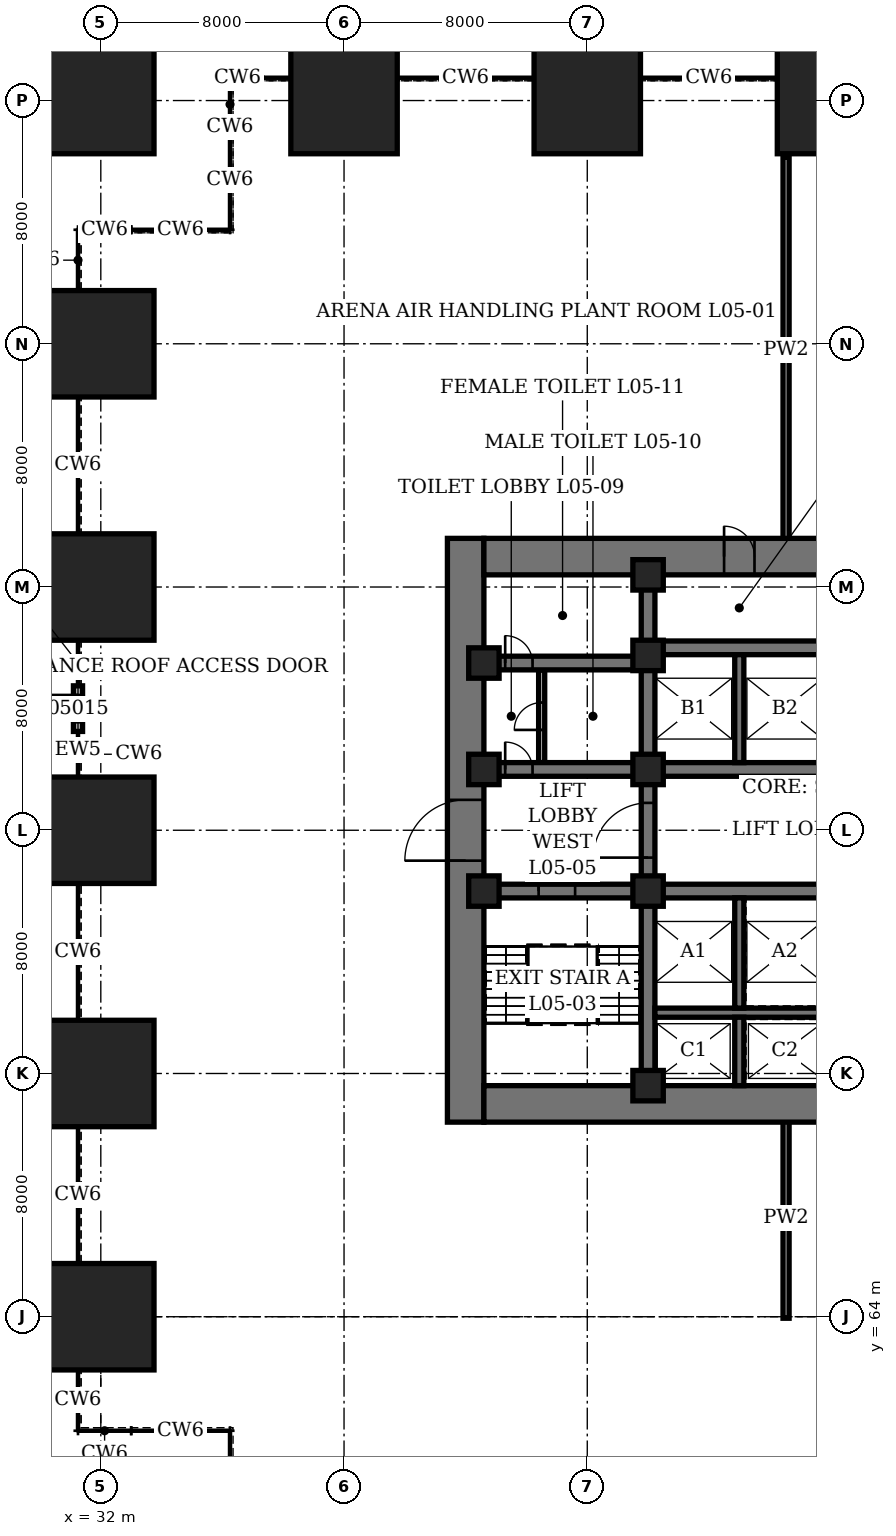
"""IFC4 building model, lengths in metres.
Left out: names, types, materials, properties, quantities, classifications, styles, units other than length and angle.
Written with IfcOpenShell. Run it as: python <this file> out.ifc"""

import sys

from ifc_helpers import new_model, si_unit, direction, frame, frame_2d, origin, origin_2d, place, context, subcontext, project, spatial, rectangle, hollow_rectangle, extrude, element, fill, save


model = new_model("IFC4")
c1 = context("Model", 3, precision=1e-05, world=origin(), true_north=direction((0.0, 1.0)))
c2 = subcontext(c1, "Body", "Model", "MODEL_VIEW")
j1 = project(units=[si_unit("LENGTHUNIT", "METRE"), si_unit("PLANEANGLEUNIT", "RADIAN")], contexts=[c1])
p1 = place(None, origin())
s1 = spatial("IfcSite", under=j1, at=p1, CompositionType="ELEMENT")
p2 = place(p1, origin())
s2 = spatial("IfcBuilding", under=s1, at=p2, CompositionType="ELEMENT")
p3 = place(p2, frame((0.0, 0.0, 25.9)))
s3 = spatial("IfcBuildingStorey", under=s2, at=p3, CompositionType="ELEMENT", Elevation=25.9)
for number, where, z_axis, x_axis in (
    (1, (32.0, 64.0, 0.0), (0.0, 0.0, 1.0), (1.0, 0.0, 0.0)),
    (2, (32.0, 72.0, 0.0), (0.0, 0.0, 1.0), (1.0, 0.0, 0.0)),
    (3, (32.0, 80.0, 0.0), (0.0, 0.0, 1.0), (1.0, 0.0, 0.0)),
    (4, (32.0, 88.0, 0.0), (0.0, 0.0, 1.0), (1.0, 0.0, 0.0)),
    (5, (32.0, 96.0, 0.0), (0.0, 0.0, 1.0), (1.0, 0.0, 0.0)),
    (6, (32.0, 104.0, 0.0), (0.0, 0.0, 1.0), (1.0, 0.0, 0.0)),
    (7, (40.0, 104.0, 0.0), (0.0, 0.0, 1.0), (1.0, 0.0, 0.0)),
    (8, (48.0, 104.0, 0.0), (0.0, 0.0, 1.0), (1.0, 0.0, 0.0)),
    (9, (56.0, 104.0, 0.0), (0.0, 0.0, 1.0), (1.0, 0.0, 0.0)),
):
    element("IfcColumn", number, at=place(p3, frame(where, z_axis=z_axis, x_axis=x_axis)), inside=s3, PredefinedType="COLUMN", context=c2, shape_type="SweptSolid", body=[
        extrude(hollow_rectangle(XDim=3.5, YDim=3.5, WallThickness=0.5, at=origin_2d()), origin(), (0.0, 0.0, 1.0), 8.7),
    ])
p4 = place(p3, frame((44.0, 70.4, 0.0), z_axis=(0.0, 0.0, 1.0), x_axis=(0.0, 1.0, 0.0)))
e10 = element("IfcWall", 10, at=p4, inside=s3, PredefinedType="SHEAR", context=c2, shape_type="SweptSolid", body=[
    extrude(rectangle(XDim=19.2, YDim=1.2, at=frame_2d((9.6, 0.0))), origin(), (0.0, 0.0, 1.0), 9.0),
])
p5 = place(p4, frame((8.6, 0.0, 0.0)))
e11 = element("IfcOpeningElement", 11, at=p5, cuts=e10, PredefinedType="OPENING", context=c2, shape_type="SweptSolid", body=[
    extrude(rectangle(XDim=2.0, YDim=2.4, at=frame_2d((1.0, 1.2))), frame((0.0, 0.61, 0.0), z_axis=(0.0, -1.0, 0.0), x_axis=(1.0, 0.0, 0.0)), (0.0, 0.0, 1.0), 1.22),
])
p6 = place(p3, frame((44.6, 71.0, 0.0), z_axis=(0.0, 0.0, 1.0), x_axis=(1.0, 0.0, 0.0)))
e12 = element("IfcWall", 12, at=p6, inside=s3, PredefinedType="SHEAR", context=c2, shape_type="SweptSolid", body=[
    extrude(rectangle(XDim=22.8, YDim=1.2, at=frame_2d((11.4, 0.0))), origin(), (0.0, 0.0, 1.0), 9.0),
])
p7 = place(p3, frame((44.6, 89.0, 0.0), z_axis=(0.0, 0.0, 1.0), x_axis=(1.0, 0.0, 0.0)))
e13 = element("IfcWall", 13, at=p7, inside=s3, PredefinedType="SHEAR", context=c2, shape_type="SweptSolid", body=[
    extrude(rectangle(XDim=22.8, YDim=1.2, at=frame_2d((11.4, 0.0))), origin(), (0.0, 0.0, 1.0), 9.0),
])
p8 = place(p7, frame((7.9, 0.0, 0.0)))
e14 = element("IfcOpeningElement", 14, at=p8, cuts=e13, PredefinedType="OPENING", context=c2, shape_type="SweptSolid", body=[
    extrude(rectangle(XDim=1.0, YDim=2.1, at=frame_2d((0.5, 1.05))), frame((0.0, 0.61, 0.0), z_axis=(0.0, -1.0, 0.0), x_axis=(1.0, 0.0, 0.0)), (0.0, 0.0, 1.0), 1.22),
])
p9 = place(p7, frame((13.95, 0.0, 0.0)))
e15 = element("IfcOpeningElement", 15, at=p9, cuts=e13, PredefinedType="OPENING", context=c2, shape_type="SweptSolid", body=[
    extrude(rectangle(XDim=0.9, YDim=2.1, at=frame_2d((0.45, 1.05))), frame((0.0, 0.61, 0.0), z_axis=(0.0, -1.0, 0.0), x_axis=(1.0, 0.0, 0.0)), (0.0, 0.0, 1.0), 1.22),
])
p10 = place(p3, frame((50.0, 71.6, 0.0), z_axis=(0.0, 0.0, 1.0), x_axis=(0.0, 1.0, 0.0)))
e16 = element("IfcWall", 16, at=p10, inside=s3, PredefinedType="SHEAR", context=c2, shape_type="SweptSolid", body=[
    extrude(rectangle(XDim=16.8, YDim=0.45, at=frame_2d((8.4, 0.0))), origin(), (0.0, 0.0, 1.0), 9.0),
])
p11 = place(p10, frame((7.5, 0.0, 0.0)))
e17 = element("IfcOpeningElement", 17, at=p11, cuts=e16, PredefinedType="OPENING", context=c2, shape_type="SweptSolid", body=[
    extrude(rectangle(XDim=1.8, YDim=2.4, at=frame_2d((0.9, 1.2))), frame((0.0, 0.235, 0.0), z_axis=(0.0, -1.0, 0.0), x_axis=(1.0, 0.0, 0.0)), (0.0, 0.0, 1.0), 0.47),
])
p12 = place(p3, frame((44.6, 78.0, 0.0), z_axis=(0.0, 0.0, 1.0), x_axis=(1.0, 0.0, 0.0)))
e18 = element("IfcWall", 18, at=p12, inside=s3, PredefinedType="SHEAR", context=c2, shape_type="SweptSolid", body=[
    extrude(rectangle(XDim=5.175, YDim=0.45, at=frame_2d((2.587, 0.0))), origin(), (0.0, 0.0, 1.0), 9.0),
])
p13 = place(p12, frame((1.8, 0.0, 0.0)))
e19 = element("IfcOpeningElement", 19, at=p13, cuts=e18, PredefinedType="OPENING", context=c2, shape_type="SweptSolid", body=[
    extrude(rectangle(XDim=1.2, YDim=2.1, at=frame_2d((0.6, 1.05))), frame((0.0, 0.235, 0.0), z_axis=(0.0, -1.0, 0.0), x_axis=(1.0, 0.0, 0.0)), (0.0, 0.0, 1.0), 0.47),
])
p14 = place(p3, frame((44.6, 82.0, 0.0), z_axis=(0.0, 0.0, 1.0), x_axis=(1.0, 0.0, 0.0)))
e20 = element("IfcWall", 20, at=p14, inside=s3, PredefinedType="SHEAR", context=c2, shape_type="SweptSolid", body=[
    extrude(rectangle(XDim=5.175, YDim=0.45, at=frame_2d((2.587, 0.0))), origin(), (0.0, 0.0, 1.0), 9.0),
])
p15 = place(p14, frame((0.7, 0.0, 0.0)))
e21 = element("IfcOpeningElement", 21, at=p15, cuts=e20, PredefinedType="OPENING", context=c2, shape_type="SweptSolid", body=[
    extrude(rectangle(XDim=0.9, YDim=2.1, at=frame_2d((0.45, 1.05))), frame((0.0, 0.235, 0.0), z_axis=(0.0, -1.0, 0.0), x_axis=(1.0, 0.0, 0.0)), (0.0, 0.0, 1.0), 0.47),
])
p16 = place(p3, frame((44.6, 85.5, 0.0), z_axis=(0.0, 0.0, 1.0), x_axis=(1.0, 0.0, 0.0)))
e22 = element("IfcWall", 22, at=p16, inside=s3, PredefinedType="SHEAR", context=c2, shape_type="SweptSolid", body=[
    extrude(rectangle(XDim=5.175, YDim=0.45, at=frame_2d((2.587, 0.0))), origin(), (0.0, 0.0, 1.0), 9.0),
])
p17 = place(p16, frame((0.7, 0.0, 0.0)))
e23 = element("IfcOpeningElement", 23, at=p17, cuts=e22, PredefinedType="OPENING", context=c2, shape_type="SweptSolid", body=[
    extrude(rectangle(XDim=0.9, YDim=2.1, at=frame_2d((0.45, 1.05))), frame((0.0, 0.235, 0.0), z_axis=(0.0, -1.0, 0.0), x_axis=(1.0, 0.0, 0.0)), (0.0, 0.0, 1.0), 0.47),
])
for number, where, z_axis, x_axis in (
    (24, (50.225, 78.0, 0.0), (0.0, 0.0, 1.0), (1.0, 0.0, 0.0)),
    (25, (50.225, 82.0, 0.0), (0.0, 0.0, 1.0), (1.0, 0.0, 0.0)),
    (26, (50.225, 86.0, 0.0), (0.0, 0.0, 1.0), (1.0, 0.0, 0.0)),
):
    element("IfcWall", number, at=place(p3, frame(where, z_axis=z_axis, x_axis=x_axis)), inside=s3, PredefinedType="SHEAR", context=c2, shape_type="SweptSolid", body=[
        extrude(rectangle(XDim=11.55, YDim=0.45, at=frame_2d((5.775, 0.0))), origin(), (0.0, 0.0, 1.0), 9.0),
    ])
p18 = place(p3, frame((50.225, 74.0, 0.0), z_axis=(0.0, 0.0, 1.0), x_axis=(1.0, 0.0, 0.0)))
e27 = element("IfcWall", 27, at=p18, inside=s3, PredefinedType="SHEAR", context=c2, shape_type="SweptSolid", body=[
    extrude(rectangle(XDim=11.55, YDim=0.3, at=frame_2d((5.775, 0.0))), origin(), (0.0, 0.0, 1.0), 9.0),
])
p19 = place(p3, frame((53.0, 71.6, 0.0), z_axis=(0.0, 0.0, 1.0), x_axis=(0.0, 1.0, 0.0)))
e28 = element("IfcWall", 28, at=p19, inside=s3, PredefinedType="SHEAR", context=c2, shape_type="SweptSolid", body=[
    extrude(rectangle(XDim=2.25, YDim=0.3, at=frame_2d((1.125, 0.0))), origin(), (0.0, 0.0, 1.0), 9.0),
])
p20 = place(p3, frame((53.0, 74.15, 0.0), z_axis=(0.0, 0.0, 1.0), x_axis=(0.0, 1.0, 0.0)))
e29 = element("IfcWall", 29, at=p20, inside=s3, PredefinedType="SHEAR", context=c2, shape_type="SweptSolid", body=[
    extrude(rectangle(XDim=3.625, YDim=0.3, at=frame_2d((1.812, 0.0))), origin(), (0.0, 0.0, 1.0), 9.0),
])
p21 = place(p3, frame((53.0, 82.225, 0.0), z_axis=(0.0, 0.0, 1.0), x_axis=(0.0, 1.0, 0.0)))
e30 = element("IfcWall", 30, at=p21, inside=s3, PredefinedType="SHEAR", context=c2, shape_type="SweptSolid", body=[
    extrude(rectangle(XDim=3.55, YDim=0.3, at=frame_2d((1.775, 0.0))), origin(), (0.0, 0.0, 1.0), 9.0),
])
for number, where, z_axis, x_axis in (
    (31, (44.6, 78.0, 0.0), (0.0, 0.0, 1.0), (1.0, 0.0, 0.0)),
    (32, (44.6, 82.0, 0.0), (0.0, 0.0, 1.0), (1.0, 0.0, 0.0)),
    (33, (44.6, 85.5, 0.0), (0.0, 0.0, 1.0), (1.0, 0.0, 0.0)),
    (34, (50.0, 71.6, 0.0), (0.0, 0.0, 1.0), (1.0, 0.0, 0.0)),
    (35, (50.0, 78.0, 0.0), (0.0, 0.0, 1.0), (1.0, 0.0, 0.0)),
    (36, (50.0, 82.0, 0.0), (0.0, 0.0, 1.0), (1.0, 0.0, 0.0)),
    (37, (50.0, 85.75, 0.0), (0.0, 0.0, 1.0), (1.0, 0.0, 0.0)),
    (38, (50.0, 88.4, 0.0), (0.0, 0.0, 1.0), (1.0, 0.0, 0.0)),
):
    element("IfcColumn", number, at=place(p3, frame(where, z_axis=z_axis, x_axis=x_axis)), inside=s3, PredefinedType="COLUMN", context=c2, shape_type="SweptSolid", body=[
        extrude(hollow_rectangle(XDim=1.0, YDim=1.0, WallThickness=0.15, at=origin_2d()), origin(), (0.0, 0.0, 1.0), 9.0),
    ])
p22 = place(p3, frame((31.25, 84.75, 0.0), z_axis=(0.0, 0.0, 1.0), x_axis=(0.0, -1.0, 0.0)))
e39 = element("IfcWall", 39, at=p22, inside=s3, PredefinedType="SOLIDWALL", context=c2, shape_type="SweptSolid", body=[
    extrude(rectangle(XDim=1.5, YDim=0.3, at=frame_2d((0.75, 0.0))), origin(), (0.0, 0.0, 1.0), 3.7),
])
p23 = place(p22, frame((0.3, 0.0, 0.0)))
e40 = element("IfcOpeningElement", 40, at=p23, cuts=e39, PredefinedType="OPENING", context=c2, shape_type="SweptSolid", body=[
    extrude(rectangle(XDim=0.9, YDim=2.1, at=frame_2d((0.45, 1.05))), frame((0.0, 0.16, 0.0), z_axis=(0.0, -1.0, 0.0), x_axis=(1.0, 0.0, 0.0)), (0.0, 0.0, 1.0), 0.32),
])
p24 = place(p3, frame((46.5, 82.225, 0.0), z_axis=(0.0, 0.0, 1.0), x_axis=(0.0, 1.0, 0.0)))
e41 = element("IfcWall", 41, at=p24, inside=s3, PredefinedType="PARTITIONING", context=c2, shape_type="SweptSolid", body=[
    extrude(rectangle(XDim=3.05, YDim=0.2, at=frame_2d((1.525, 0.0))), origin(), (0.0, 0.0, 1.0), 8.7),
])
p25 = place(p24, frame((1.075, 0.0, 0.0)))
e42 = element("IfcOpeningElement", 42, at=p25, cuts=e41, PredefinedType="OPENING", context=c2, shape_type="SweptSolid", body=[
    extrude(rectangle(XDim=0.9, YDim=2.1, at=frame_2d((0.45, 1.05))), frame((0.0, 0.11, 0.0), z_axis=(0.0, -1.0, 0.0), x_axis=(1.0, 0.0, 0.0)), (0.0, 0.0, 1.0), 0.22),
])
p26 = place(p3, frame((54.539, 89.45, 0.0), z_axis=(0.0, 0.0, 1.0), x_axis=(0.0, 1.0, 0.0)))
e43 = element("IfcWall", 43, at=p26, inside=s3, PredefinedType="PARTITIONING", context=c2, shape_type="SweptSolid", body=[
    extrude(rectangle(XDim=12.7, YDim=0.2, at=frame_2d((6.35, 0.0))), origin(), (0.0, 0.0, 1.0), 7.928),
])
p27 = place(p3, frame((54.539, 63.95, 0.0), z_axis=(0.0, 0.0, 1.0), x_axis=(0.0, 1.0, 0.0)))
e44 = element("IfcWall", 44, at=p27, inside=s3, PredefinedType="PARTITIONING", context=c2, shape_type="SweptSolid", body=[
    extrude(rectangle(XDim=6.6, YDim=0.2, at=frame_2d((3.3, 0.0))), origin(), (0.0, 0.0, 1.0), 7.928),
])
p28 = place(p15, origin())
e45 = element("IfcDoor", 45, at=p28, inside=s3, OperationType="SINGLE_SWING_LEFT", PredefinedType="DOOR", context=c2, shape_type="SweptSolid", body=[
    extrude(rectangle(XDim=0.9, YDim=2.1, at=frame_2d((0.45, 1.05))), frame((0.0, 0.225, 0.0), z_axis=(0.0, -1.0, 0.0), x_axis=(1.0, 0.0, 0.0)), (0.0, 0.0, 1.0), 0.449),
])
fill(e21, e45)
p29 = place(p25, origin())
e46 = element("IfcDoor", 46, at=p29, inside=s3, OperationType="SINGLE_SWING_RIGHT", PredefinedType="DOOR", context=c2, shape_type="SweptSolid", body=[
    extrude(rectangle(XDim=0.9, YDim=2.1, at=frame_2d((0.45, 1.05))), frame((0.0, 0.1, 0.0), z_axis=(0.0, -1.0, 0.0), x_axis=(1.0, 0.0, 0.0)), (0.0, 0.0, 1.0), 0.199),
])
fill(e42, e46)
p30 = place(p17, origin())
e47 = element("IfcDoor", 47, at=p30, inside=s3, OperationType="SINGLE_SWING_RIGHT", PredefinedType="DOOR", context=c2, shape_type="SweptSolid", body=[
    extrude(rectangle(XDim=0.9, YDim=2.1, at=frame_2d((0.45, 1.05))), frame((0.0, 0.225, 0.0), z_axis=(0.0, -1.0, 0.0), x_axis=(1.0, 0.0, 0.0)), (0.0, 0.0, 1.0), 0.449),
])
fill(e23, e47)
p31 = place(p8, origin())
e48 = element("IfcDoor", 48, at=p31, inside=s3, OperationType="SINGLE_SWING_LEFT", PredefinedType="DOOR", context=c2, shape_type="SweptSolid", body=[
    extrude(rectangle(XDim=1.0, YDim=2.1, at=frame_2d((0.5, 1.05))), frame((0.0, 0.35, 0.0), z_axis=(0.0, -1.0, 0.0), x_axis=(1.0, 0.0, 0.0)), (0.0, 0.0, 1.0), 0.7),
])
fill(e14, e48)
p32 = place(p13, origin())
e49 = element("IfcDoor", 49, at=p32, inside=s3, OperationType="SINGLE_SWING_LEFT", PredefinedType="DOOR", context=c2, shape_type="SweptSolid", body=[
    extrude(rectangle(XDim=1.2, YDim=2.1, at=frame_2d((0.6, 1.05))), frame((0.0, 0.225, 0.0), z_axis=(0.0, -1.0, 0.0), x_axis=(1.0, 0.0, 0.0)), (0.0, 0.0, 1.0), 0.449),
])
fill(e19, e49)
p33 = place(p5, origin())
e50 = element("IfcDoor", 50, at=p33, inside=s3, OperationType="DOUBLE_DOOR_SINGLE_SWING", PredefinedType="DOOR", context=c2, shape_type="SweptSolid", body=[
    extrude(rectangle(XDim=2.0, YDim=2.4, at=frame_2d((1.0, 1.2))), frame((0.0, 0.35, 0.0), z_axis=(0.0, -1.0, 0.0), x_axis=(1.0, 0.0, 0.0)), (0.0, 0.0, 1.0), 0.7),
])
fill(e11, e50)
p34 = place(p11, origin())
e51 = element("IfcDoor", 51, at=p34, inside=s3, OperationType="DOUBLE_DOOR_SINGLE_SWING", PredefinedType="DOOR", context=c2, shape_type="SweptSolid", body=[
    extrude(rectangle(XDim=1.8, YDim=2.4, at=frame_2d((0.9, 1.2))), frame((0.0, 0.225, 0.0), z_axis=(0.0, -1.0, 0.0), x_axis=(1.0, 0.0, 0.0)), (0.0, 0.0, 1.0), 0.449),
])
fill(e17, e51)
p35 = place(p23, frame((0.9, 0.0, 0.0), z_axis=(0.0, 0.0, 1.0), x_axis=(-1.0, 0.0, 0.0)))
e52 = element("IfcDoor", 52, at=p35, inside=s3, OperationType="SINGLE_SWING_RIGHT", PredefinedType="DOOR", context=c2, shape_type="SweptSolid", body=[
    extrude(rectangle(XDim=0.9, YDim=2.1, at=frame_2d((0.45, 1.05))), frame((0.0, 0.15, 0.0), z_axis=(0.0, -1.0, 0.0), x_axis=(1.0, 0.0, 0.0)), (0.0, 0.0, 1.0), 0.3),
])
fill(e40, e52)
save(model, sys.argv[1])
